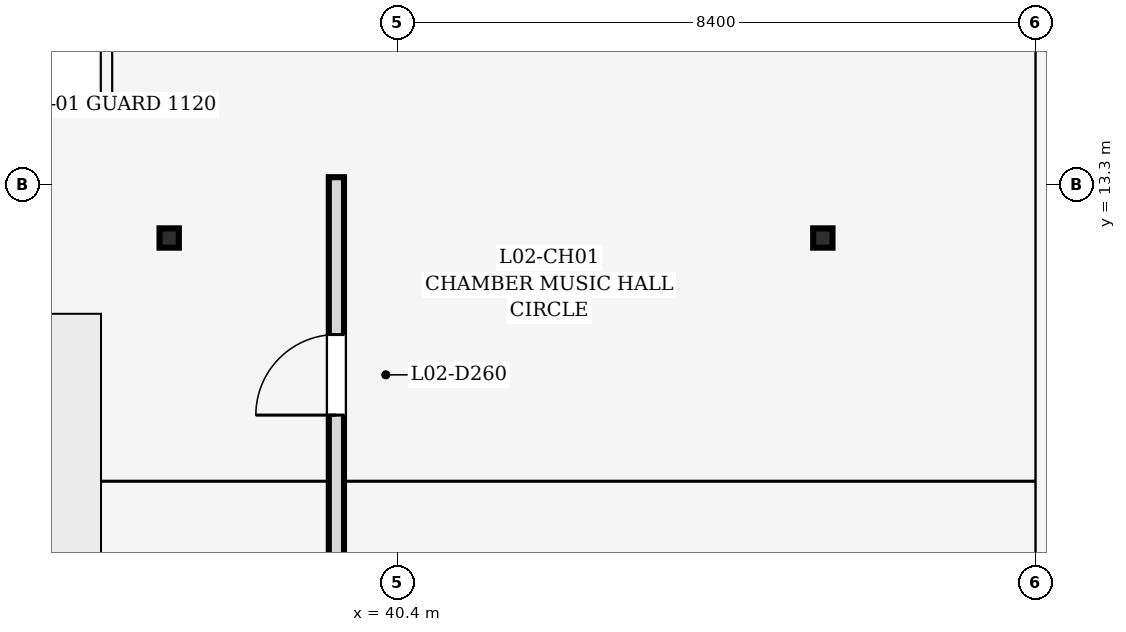
"""IFC4 building model, lengths in metres.
Left out: names, types, materials, properties, quantities, classifications, styles, units other than length and angle.
Written with IfcOpenShell. Run it as: python <this file> out.ifc"""

import sys

from ifc_helpers import new_model, si_unit, direction, frame, frame_2d, origin, origin_2d, place, context, subcontext, project, spatial, rectangle, i_section, extrude, element, fill, save


model = new_model("IFC4")
c1 = context("Model", 3, precision=1e-05, world=origin(), true_north=direction((0.0, 1.0)))
c2 = subcontext(c1, "Body", "Model", "MODEL_VIEW")
j1 = project(units=[si_unit("LENGTHUNIT", "METRE"), si_unit("PLANEANGLEUNIT", "RADIAN")], contexts=[c1])
p1 = place(None, origin())
s1 = spatial("IfcSite", under=j1, at=p1, CompositionType="ELEMENT")
p2 = place(p1, origin())
s2 = spatial("IfcBuilding", under=s1, at=p2, CompositionType="ELEMENT")
p3 = place(p2, frame((0.0, 0.0, 5.4)))
s3 = spatial("IfcBuildingStorey", under=s2, at=p3, CompositionType="ELEMENT", Elevation=5.4)
for number, where, z_axis, x_axis in (
    (1, (37.4, 12.6, 0.0), (0.0, 0.0, 1.0), (1.0, 0.0, 0.0)),
    (2, (46.0, 12.6, 0.0), (0.0, 0.0, 1.0), (1.0, 0.0, 0.0)),
):
    element("IfcColumn", number, at=place(p3, frame(where, z_axis=z_axis, x_axis=x_axis)), inside=s3, PredefinedType="COLUMN", context=c2, shape_type="SweptSolid", body=[
        extrude(i_section(OverallWidth=0.254, OverallDepth=0.254, WebThickness=0.009, FlangeThickness=0.014, at=origin_2d()), origin(), (0.0, 0.0, 1.0), 4.8),
    ])
p4 = place(p3, frame((39.6, 8.2, 0.0), z_axis=(0.0, 0.0, 1.0), x_axis=(0.0, 1.0, 0.0)))
e3 = element("IfcWall", 3, at=p4, inside=s3, PredefinedType="PARTITIONING", context=c2, shape_type="SweptSolid", body=[
    extrude(rectangle(XDim=5.2, YDim=0.2, at=frame_2d((2.6, 0.0))), origin(), (0.0, 0.0, 1.0), 4.525),
])
p5 = place(p4, frame((2.07, 0.0, 0.0)))
e4 = element("IfcOpeningElement", 4, at=p5, cuts=e3, PredefinedType="OPENING", context=c2, shape_type="SweptSolid", body=[
    extrude(rectangle(XDim=1.06, YDim=2.24, at=frame_2d((0.53, 1.12))), frame((0.0, 0.112, 0.0), z_axis=(0.0, -1.0, 0.0), x_axis=(1.0, 0.0, 0.0)), (0.0, 0.0, 1.0), 0.224),
])
p6 = place(p5, origin())
e5 = element("IfcDoor", 5, at=p6, inside=s3, OperationType="SINGLE_SWING_LEFT", PredefinedType="DOOR", context=c2, shape_type="SweptSolid", body=[
    extrude(rectangle(XDim=1.06, YDim=2.24, at=frame_2d((0.53, 1.12))), frame((0.0, 0.025, 0.0), z_axis=(0.0, -1.0, 0.0), x_axis=(1.0, 0.0, 0.0)), (0.0, 0.0, 1.0), 0.05),
])
fill(e4, e5)
save(model, sys.argv[1])
